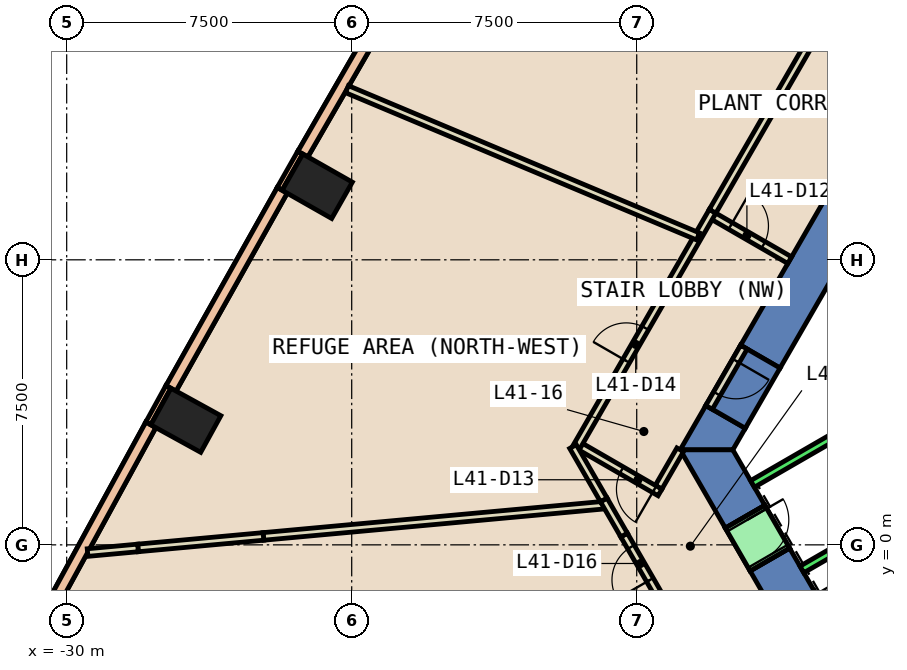
"""IFC4 building model, lengths in metres.
Left out: names, types, materials, properties, quantities, classifications, styles, units other than length and angle.
Written with IfcOpenShell. Run it as: python <this file> out.ifc"""

import sys

from ifc_helpers import new_model, si_unit, direction, frame, frame_2d, origin, origin_2d, place, context, subcontext, project, spatial, polyline, rectangle, outline, extrude, element, fill, save


model = new_model("IFC4")
c1 = context("Model", 3, precision=1e-05, world=origin(), true_north=direction((0.0, 1.0)))
c2 = subcontext(c1, "Body", "Model", "MODEL_VIEW")
j1 = project(units=[si_unit("LENGTHUNIT", "METRE"), si_unit("PLANEANGLEUNIT", "RADIAN")], contexts=[c1])
p1 = place(None, origin())
s1 = spatial("IfcSite", under=j1, at=p1, CompositionType="ELEMENT")
p2 = place(p1, origin())
s2 = spatial("IfcBuilding", under=s1, at=p2, CompositionType="ELEMENT")
p3 = place(p2, frame((0.0, 0.0, 184.4)))
s3 = spatial("IfcBuildingStorey", under=s2, at=p3, CompositionType="ELEMENT", Elevation=184.4)
for number, where, z_axis, x_axis in (
    (1, (-23.407, 9.436, -0.6), (0.0, 0.0, 1.0), (0.494, 0.869, 0.0)),
    (2, (-26.865, 3.278, -0.6), (0.0, 0.0, 1.0), (0.482, 0.876, 0.0)),
):
    element("IfcColumn", number, at=place(p3, frame(where, z_axis=z_axis, x_axis=x_axis)), inside=s3, PredefinedType="COLUMN", context=c2, shape_type="SweptSolid", body=[
        extrude(rectangle(XDim=1.1, YDim=1.5, at=origin_2d()), origin(), (0.0, 0.0, 1.0), 5.4),
    ])
p4 = place(p3, frame((0.0, 0.0, -0.6)))
e3 = element("IfcWall", 3, at=p4, inside=s3, PredefinedType="SHEAR", context=c2, shape_type="SweptSolid", body=[
    extrude(outline(polyline([(-12.267, 5.252), (-11.228, 4.652), (-6.235, 13.3), (-6.928, 14.5), (-12.267, 5.252)])), origin(), (0.0, 0.0, 1.0), 5.4),
])
p5 = place(p3, frame((0.0, 0.0, -0.6)))
e4 = element("IfcWall", 4, at=p5, inside=s3, PredefinedType="SHEAR", context=c2, shape_type="SweptSolid", body=[
    extrude(outline(polyline([(-12.143, 3.068), (-13.182, 3.667), (-13.856, 2.5), (-12.471, 2.5), (-12.143, 3.068)])), origin(), (0.0, 0.0, 1.0), 5.4),
])
p6 = place(p3, frame((0.0, 0.0, 3.6)))
e5 = element("IfcWall", 5, at=p6, inside=s3, PredefinedType="SHEAR", context=c2, shape_type="SweptSolid", body=[
    extrude(outline(polyline([(-13.182, 3.667), (-12.143, 3.068), (-11.228, 4.652), (-12.267, 5.252), (-13.182, 3.667)])), origin(), (0.0, 0.0, 1.0), 1.2),
])
p7 = place(p3, frame((0.0, 0.0, -0.6)))
e6 = element("IfcWall", 6, at=p7, inside=s3, PredefinedType="SHEAR", context=c2, shape_type="SweptSolid", body=[
    extrude(outline(polyline([(-12.667, 0.44), (-11.628, 1.04), (-12.471, 2.5), (-13.856, 2.5), (-12.667, 0.44)])), origin(), (0.0, 0.0, 1.0), 5.4),
])
p8 = place(p3, frame((0.0, 0.0, -0.6)))
e7 = element("IfcWall", 7, at=p8, inside=s3, PredefinedType="SHEAR", context=c2, shape_type="SweptSolid", body=[
    extrude(outline(polyline([(-11.367, -1.811), (-10.328, -1.211), (-10.978, -0.086), (-12.017, -0.686), (-11.367, -1.811)])), origin(), (0.0, 0.0, 1.0), 5.4),
])
p9 = place(p3, frame((0.0, 0.0, 3.6)))
e8 = element("IfcWall", 8, at=p9, inside=s3, PredefinedType="SHEAR", context=c2, shape_type="SweptSolid", body=[
    extrude(outline(polyline([(-12.017, -0.686), (-10.978, -0.086), (-11.628, 1.04), (-12.667, 0.44), (-12.017, -0.686)])), origin(), (0.0, 0.0, 1.0), 1.2),
])
p10 = place(p3, frame((-23.853, 10.322, 0.0), z_axis=(0.0, 0.0, 1.0), x_axis=(-0.494512685492, -0.869170411305, 0.0)))
e9 = element("IfcWall", 9, at=p10, inside=s3, PredefinedType="STANDARD", context=c2, shape_type="SweptSolid", body=[
    extrude(rectangle(XDim=1.1, YDim=0.15, at=frame_2d((0.55, 0.0))), origin(), (0.0, 0.0, 1.0), 4.8),
])
p11 = place(p3, frame((-27.323, 4.158, 0.0), z_axis=(0.0, 0.0, 1.0), x_axis=(-0.481850587491, -0.876253394478, 0.0)))
e10 = element("IfcWall", 10, at=p11, inside=s3, PredefinedType="STANDARD", context=c2, shape_type="SweptSolid", body=[
    extrude(rectangle(XDim=1.1, YDim=0.15, at=frame_2d((0.55, 0.0))), origin(), (0.0, 0.0, 1.0), 4.8),
])
p12 = place(p3, frame((-20.797, 15.458, 0.0), z_axis=(0.0, 0.0, 1.0), x_axis=(-0.499926373932, -0.866067907642, 0.0)))
e11 = element("IfcWall", 11, at=p12, inside=s3, PredefinedType="STANDARD", context=c2, shape_type="SweptSolid", body=[
    extrude(rectangle(XDim=5.977, YDim=0.3, at=frame_2d((2.988, 0.0))), origin(), (0.0, 0.0, 1.0), 1.2),
])
p13 = place(p3, frame((-20.797, 15.458, 4.0), z_axis=(0.0, 0.0, 1.0), x_axis=(-0.499926373932, -0.866067907642, 0.0)))
e12 = element("IfcWall", 12, at=p13, inside=s3, PredefinedType="STANDARD", context=c2, shape_type="SweptSolid", body=[
    extrude(rectangle(XDim=5.977, YDim=0.3, at=frame_2d((2.988, 0.0))), origin(), (0.0, 0.0, 1.0), 0.8),
])
p14 = place(p3, frame((-24.328, 9.328, 0.0), z_axis=(0.0, 0.0, 1.0), x_axis=(-0.489679181332, -0.871902689163, 0.0)))
e13 = element("IfcWall", 13, at=p14, inside=s3, PredefinedType="STANDARD", context=c2, shape_type="SweptSolid", body=[
    extrude(rectangle(XDim=5.975, YDim=0.3, at=frame_2d((2.988, 0.0))), origin(), (0.0, 0.0, 1.0), 1.2),
])
p15 = place(p3, frame((-24.328, 9.328, 4.0), z_axis=(0.0, 0.0, 1.0), x_axis=(-0.489679181332, -0.871902689163, 0.0)))
e14 = element("IfcWall", 14, at=p15, inside=s3, PredefinedType="STANDARD", context=c2, shape_type="SweptSolid", body=[
    extrude(rectangle(XDim=5.975, YDim=0.3, at=frame_2d((2.988, 0.0))), origin(), (0.0, 0.0, 1.0), 0.8),
])
p16 = place(p3, frame((-27.786, 3.158, 0.0), z_axis=(0.0, 0.0, 1.0), x_axis=(-0.479192671498, -0.87770973766, 0.0)))
e15 = element("IfcWall", 15, at=p16, inside=s3, PredefinedType="STANDARD", context=c2, shape_type="SweptSolid", body=[
    extrude(rectangle(XDim=5.977, YDim=0.3, at=frame_2d((2.988, 0.0))), origin(), (0.0, 0.0, 1.0), 1.2),
])
p17 = place(p3, frame((-27.786, 3.158, 4.0), z_axis=(0.0, 0.0, 1.0), x_axis=(-0.479192671498, -0.87770973766, 0.0)))
e16 = element("IfcWall", 16, at=p17, inside=s3, PredefinedType="STANDARD", context=c2, shape_type="SweptSolid", body=[
    extrude(rectangle(XDim=5.977, YDim=0.3, at=frame_2d((2.988, 0.0))), origin(), (0.0, 0.0, 1.0), 0.8),
])
p18 = place(p3, frame((-13.053, 8.691, 0.0), z_axis=(0.0, 0.0, 1.0), x_axis=(0.865973769406, -0.500089422704, 0.0)))
e17 = element("IfcWall", 17, at=p18, inside=s3, PredefinedType="PARTITIONING", context=c2, shape_type="SweptSolid", body=[
    extrude(rectangle(XDim=2.399, YDim=0.2, at=frame_2d((1.2, 0.0))), origin(), (0.0, 0.0, 1.0), 4.8),
])
p19 = place(p18, frame((0.6, 0.0, 0.0)))
e18 = element("IfcOpeningElement", 18, at=p19, cuts=e17, PredefinedType="OPENING", context=c2, shape_type="SweptSolid", body=[
    extrude(rectangle(XDim=1.0, YDim=2.1, at=frame_2d((0.5, 1.05))), frame((0.0, 0.11, 0.0), z_axis=(0.0, -1.0, 0.0), x_axis=(1.0, 0.0, 0.0)), (0.0, 0.0, 1.0), 0.22),
])
p20 = place(p3, frame((-13.856, 2.501, 0.0), z_axis=(0.0, 0.0, 1.0), x_axis=(-0.500316932756, -0.865842345233, 0.0)))
e19 = element("IfcWall", 19, at=p20, inside=s3, PredefinedType="PARTITIONING", context=c2, shape_type="SweptSolid", body=[
    extrude(rectangle(XDim=1.137, YDim=0.2, at=frame_2d((0.569, 0.0))), origin(), (0.0, 0.0, 1.0), 4.8),
])
p21 = place(p3, frame((-14.388, 1.379, 0.0), z_axis=(0.0, 0.0, 1.0), x_axis=(-0.866022959057, 0.500004234368, 0.0)))
e20 = element("IfcWall", 20, at=p21, inside=s3, PredefinedType="PARTITIONING", context=c2, shape_type="SweptSolid", body=[
    extrude(rectangle(XDim=2.5, YDim=0.2, at=frame_2d((1.25, 0.0))), origin(), (0.0, 0.0, 1.0), 4.8),
])
p22 = place(p21, frame((0.168, 0.0, 0.0)))
e21 = element("IfcOpeningElement", 21, at=p22, cuts=e20, PredefinedType="OPENING", context=c2, shape_type="SweptSolid", body=[
    extrude(rectangle(XDim=1.0, YDim=2.1, at=frame_2d((0.5, 1.05))), frame((0.0, 0.11, 0.0), z_axis=(0.0, -1.0, 0.0), x_axis=(1.0, 0.0, 0.0)), (0.0, 0.0, 1.0), 0.22),
])
p23 = place(p3, frame((-16.603, 2.542, 0.0), z_axis=(0.0, 0.0, 1.0), x_axis=(0.499968011863, 0.866043871356, 0.0)))
e22 = element("IfcWall", 22, at=p23, inside=s3, PredefinedType="PARTITIONING", context=c2, shape_type="SweptSolid", body=[
    extrude(rectangle(XDim=7.201, YDim=0.2, at=frame_2d((3.6, 0.0))), origin(), (0.0, 0.0, 1.0), 4.8),
])
p24 = place(p23, frame((2.654, 0.0, 0.0)))
e23 = element("IfcOpeningElement", 23, at=p24, cuts=e22, PredefinedType="OPENING", context=c2, shape_type="SweptSolid", body=[
    extrude(rectangle(XDim=1.0, YDim=2.1, at=frame_2d((0.5, 1.05))), frame((0.0, 0.11, 0.0), z_axis=(0.0, -1.0, 0.0), x_axis=(1.0, 0.0, 0.0)), (0.0, 0.0, 1.0), 0.22),
])
p25 = place(p3, frame((-13.003, 8.778, 0.0), z_axis=(0.0, 0.0, 1.0), x_axis=(0.499964736285, 0.866045762343, 0.0)))
e24 = element("IfcWall", 24, at=p25, inside=s3, PredefinedType="PARTITIONING", context=c2, shape_type="SweptSolid", body=[
    extrude(rectangle(XDim=9.479, YDim=0.2, at=frame_2d((4.739, 0.0))), origin(), (0.0, 0.0, 1.0), 4.8),
])
p26 = place(p25, frame((7.862, 0.0, 0.0)))
e25 = element("IfcOpeningElement", 25, at=p26, cuts=e24, PredefinedType="OPENING", context=c2, shape_type="SweptSolid", body=[
    extrude(rectangle(XDim=1.0, YDim=2.1, at=frame_2d((0.5, 1.05))), frame((0.0, 0.11, 0.0), z_axis=(0.0, -1.0, 0.0), x_axis=(1.0, 0.0, 0.0)), (0.0, 0.0, 1.0), 0.22),
])
p27 = place(p3, frame((-14.001, -2.05, 0.0), z_axis=(0.0, 0.0, 1.0), x_axis=(-0.499844057801, 0.866115418337, 0.0)))
e26 = element("IfcWall", 26, at=p27, inside=s3, PredefinedType="PARTITIONING", context=c2, shape_type="SweptSolid", body=[
    extrude(rectangle(XDim=2.665, YDim=0.2, at=frame_2d((1.333, 0.0))), origin(), (0.0, 0.0, 1.0), 2.4),
])
p28 = place(p27, frame((1.301, 0.0, 0.0)))
e27 = element("IfcOpeningElement", 27, at=p28, cuts=e26, PredefinedType="OPENING", context=c2, shape_type="SweptSolid", body=[
    extrude(rectangle(XDim=1.0, YDim=2.1, at=frame_2d((0.5, 1.05))), frame((0.0, 0.11, 0.0), z_axis=(0.0, -1.0, 0.0), x_axis=(1.0, 0.0, 0.0)), (0.0, 0.0, 1.0), 0.22),
])
p29 = place(p3, frame((-22.625, 11.99, 0.0), z_axis=(0.0, 0.0, 1.0), x_axis=(0.922173915382, -0.386775477233, 0.0)))
e28 = element("IfcWall", 28, at=p29, inside=s3, PredefinedType="PARTITIONING", context=c2, shape_type="SweptSolid", body=[
    extrude(rectangle(XDim=10.019, YDim=0.2, at=frame_2d((5.009, 0.0))), origin(), (0.0, 0.0, 1.0), 4.8),
])
p30 = place(p3, frame((-15.791, 1.051, 0.0), z_axis=(0.0, 0.0, 1.0), x_axis=(-0.995813171727, -0.091411853796, 0.0)))
e29 = element("IfcWall", 29, at=p30, inside=s3, PredefinedType="PARTITIONING", context=c2, shape_type="SweptSolid", body=[
    extrude(rectangle(XDim=9.07, YDim=0.2, at=frame_2d((4.535, 0.0))), origin(), (0.0, 0.0, 1.0), 2.4),
])
p31 = place(p3, frame((-12.181, 5.202, 0.0), z_axis=(0.0, 0.0, 1.0), x_axis=(-0.500215337403, -0.865901042976, 0.0)))
e30 = element("IfcWall", 30, at=p31, inside=s3, PredefinedType="PARTITIONING", context=c2, shape_type="SweptSolid", body=[
    extrude(rectangle(XDim=1.829, YDim=0.2, at=frame_2d((0.915, 0.0))), origin(), (0.0, 0.0, 1.0), 2.4),
])
p32 = place(p31, frame((0.415, 0.0, 0.0)))
e31 = element("IfcOpeningElement", 31, at=p32, cuts=e30, PredefinedType="OPENING", context=c2, shape_type="SweptSolid", body=[
    extrude(rectangle(XDim=1.0, YDim=2.1, at=frame_2d((0.5, 1.05))), frame((0.0, 0.11, 0.0), z_axis=(0.0, -1.0, 0.0), x_axis=(1.0, 0.0, 0.0)), (0.0, 0.0, 1.0), 0.22),
])
p33 = place(p3, frame((-15.333, 0.258, 0.0), z_axis=(0.0, 0.0, 1.0), x_axis=(-0.499900536046, 0.86608282171, 0.0)))
e32 = element("IfcWall", 32, at=p33, inside=s3, PredefinedType="PARTITIONING", context=c2, shape_type="SweptSolid", body=[
    extrude(rectangle(XDim=1.068, YDim=0.2, at=frame_2d((0.534, 0.0))), origin(), (0.0, 0.0, 1.0), 2.4),
])
p34 = place(p3, frame((-15.867, 1.183, 0.0), z_axis=(0.0, 0.0, 1.0), x_axis=(-0.499800693738, 0.866140442734, 0.0)))
e33 = element("IfcWall", 33, at=p34, inside=s3, PredefinedType="PARTITIONING", context=c2, shape_type="SweptSolid", body=[
    extrude(rectangle(XDim=1.621, YDim=0.2, at=frame_2d((0.811, 0.0))), origin(), (0.0, 0.0, 1.0), 4.8),
])
p35 = place(p3, frame((-24.823, 0.222, 0.0), z_axis=(0.0, 0.0, 1.0), x_axis=(-0.995814353382, -0.091398980293, 0.0)))
e34 = element("IfcWall", 34, at=p35, inside=s3, PredefinedType="PARTITIONING", context=c2, shape_type="SweptSolid", body=[
    extrude(rectangle(XDim=3.315, YDim=0.2, at=frame_2d((1.657, 0.0))), origin(), (0.0, 0.0, 1.0), 4.8),
])
p36 = place(p3, frame((-28.124, -0.081, 0.0), z_axis=(0.0, 0.0, 1.0), x_axis=(-0.995805575694, -0.091494564955, 0.0)))
e35 = element("IfcWall", 35, at=p36, inside=s3, PredefinedType="PARTITIONING", context=c2, shape_type="SweptSolid", body=[
    extrude(rectangle(XDim=1.332, YDim=0.2, at=frame_2d((0.666, 0.0))), origin(), (0.0, 0.0, 1.0), 2.4),
])
p37 = place(p3, frame((-9.788, 2.853, 0.0), z_axis=(0.0, 0.0, 1.0), x_axis=(-0.865998541277, -0.500046524342, 0.0)))
e36 = element("IfcWall", 36, at=p37, inside=s3, PredefinedType="STANDARD", context=c2, shape_type="SweptSolid", body=[
    extrude(rectangle(XDim=2.5, YDim=0.2, at=frame_2d((1.25, 0.0))), origin(), (0.0, 0.0, 1.0), 4.8),
])
p38 = place(p3, frame((-8.488, 0.602, 0.0), z_axis=(0.0, 0.0, 1.0), x_axis=(-0.866022959057, -0.500004234368, 0.0)))
e37 = element("IfcWall", 37, at=p38, inside=s3, PredefinedType="STANDARD", context=c2, shape_type="SweptSolid", body=[
    extrude(rectangle(XDim=2.5, YDim=0.2, at=frame_2d((1.25, 0.0))), origin(), (0.0, 0.0, 1.0), 4.8),
])
p39 = place(p3, frame((-12.148, 0.74, 0.0), z_axis=(0.0, 0.0, 1.0), x_axis=(0.500221244143, -0.865897630733, 0.0)))
e38 = element("IfcWall", 38, at=p39, inside=s3, PredefinedType="STANDARD", context=c2, shape_type="SweptSolid", body=[
    extrude(rectangle(XDim=1.299, YDim=1.2, at=frame_2d((0.65, 0.0))), origin(), (0.0, 0.0, 1.0), 2.4),
])
p40 = place(p39, frame((0.1, 0.0, 0.0)))
e39 = element("IfcOpeningElement", 39, at=p40, cuts=e38, PredefinedType="OPENING", context=c2, shape_type="SweptSolid", body=[
    extrude(rectangle(XDim=1.1, YDim=2.3, at=frame_2d((0.55, 1.15))), frame((0.0, 0.61, 0.0), z_axis=(0.0, -1.0, 0.0), x_axis=(1.0, 0.0, 0.0)), (0.0, 0.0, 1.0), 1.22),
])
p41 = place(p19, origin())
e40 = element("IfcDoor", 40, at=p41, inside=s3, OperationType="SINGLE_SWING_RIGHT", PredefinedType="DOOR", context=c2, shape_type="SweptSolid", body=[
    extrude(rectangle(XDim=1.0, YDim=2.1, at=frame_2d((0.5, 1.05))), frame((0.0, 0.025, 0.0), z_axis=(0.0, -1.0, 0.0), x_axis=(1.0, 0.0, 0.0)), (0.0, 0.0, 1.0), 0.05),
])
fill(e18, e40)
p42 = place(p22, origin())
e41 = element("IfcDoor", 41, at=p42, inside=s3, OperationType="SINGLE_SWING_LEFT", PredefinedType="DOOR", context=c2, shape_type="SweptSolid", body=[
    extrude(rectangle(XDim=1.0, YDim=2.1, at=frame_2d((0.5, 1.05))), frame((0.0, 0.025, 0.0), z_axis=(0.0, -1.0, 0.0), x_axis=(1.0, 0.0, 0.0)), (0.0, 0.0, 1.0), 0.05),
])
fill(e21, e41)
p43 = place(p24, origin())
e42 = element("IfcDoor", 42, at=p43, inside=s3, OperationType="SINGLE_SWING_RIGHT", PredefinedType="DOOR", context=c2, shape_type="SweptSolid", body=[
    extrude(rectangle(XDim=1.0, YDim=2.1, at=frame_2d((0.5, 1.05))), frame((0.0, 0.025, 0.0), z_axis=(0.0, -1.0, 0.0), x_axis=(1.0, 0.0, 0.0)), (0.0, 0.0, 1.0), 0.05),
])
fill(e23, e42)
p44 = place(p28, origin())
e43 = element("IfcDoor", 43, at=p44, inside=s3, OperationType="SINGLE_SWING_RIGHT", PredefinedType="DOOR", context=c2, shape_type="SweptSolid", body=[
    extrude(rectangle(XDim=1.0, YDim=2.1, at=frame_2d((0.5, 1.05))), frame((0.0, 0.025, 0.0), z_axis=(0.0, -1.0, 0.0), x_axis=(1.0, 0.0, 0.0)), (0.0, 0.0, 1.0), 0.05),
])
fill(e27, e43)
p45 = place(p32, origin())
e44 = element("IfcDoor", 44, at=p45, inside=s3, OperationType="SINGLE_SWING_LEFT", PredefinedType="DOOR", context=c2, shape_type="SweptSolid", body=[
    extrude(rectangle(XDim=1.0, YDim=2.1, at=frame_2d((0.5, 1.05))), frame((0.0, 0.025, 0.0), z_axis=(0.0, -1.0, 0.0), x_axis=(1.0, 0.0, 0.0)), (0.0, 0.0, 1.0), 0.05),
])
fill(e31, e44)
p46 = place(p40, origin())
e45 = element("IfcDoor", 45, at=p46, inside=s3, OperationType="SLIDING_TO_LEFT", PredefinedType="DOOR", context=c2, shape_type="SweptSolid", body=[
    extrude(rectangle(XDim=1.1, YDim=2.3, at=frame_2d((0.55, 1.15))), frame((0.0, 0.025, 0.0), z_axis=(0.0, -1.0, 0.0), x_axis=(1.0, 0.0, 0.0)), (0.0, 0.0, 1.0), 0.05),
])
fill(e39, e45)
save(model, sys.argv[1])
